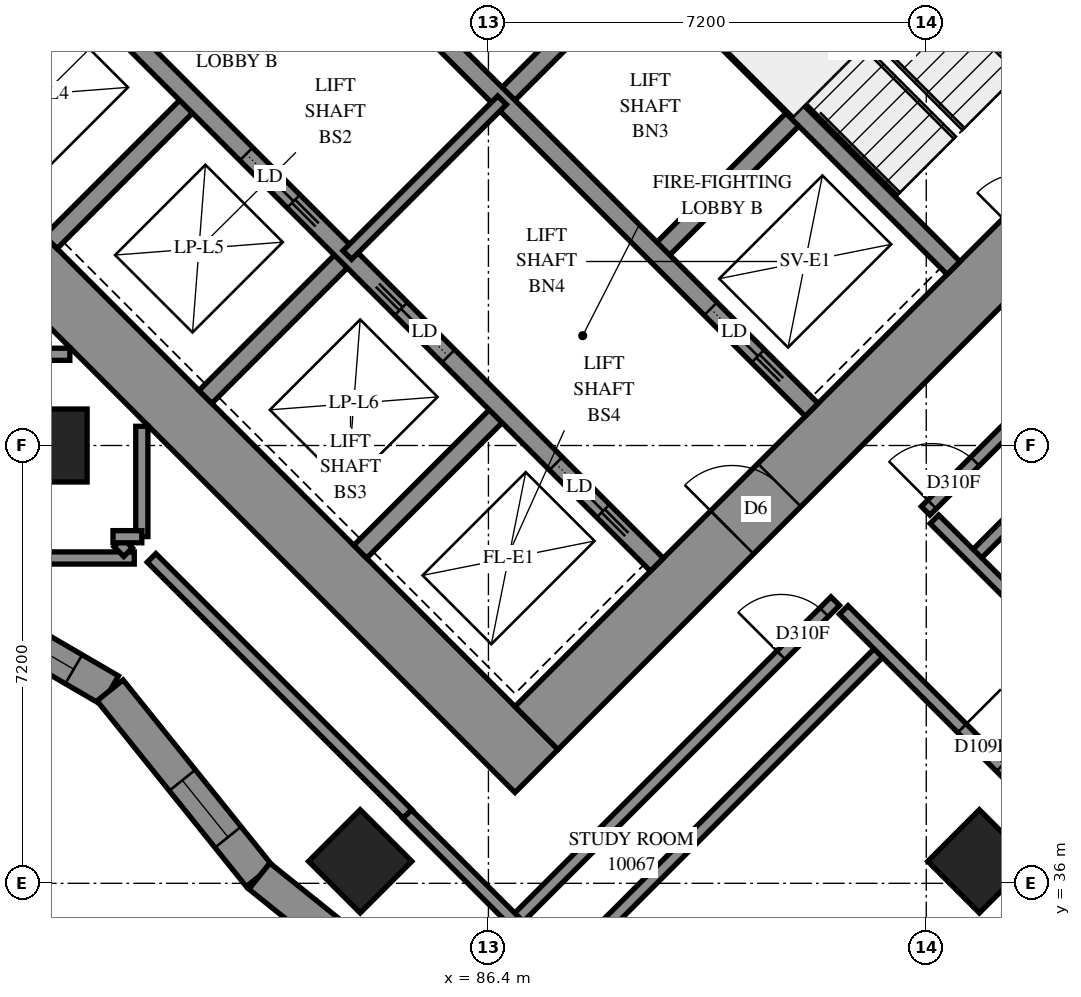
"""IFC4 building model, lengths in metres.
Left out: names, types, materials, properties, quantities, classifications, styles, units other than length and angle.
Written with IfcOpenShell. Run it as: python <this file> out.ifc"""

import sys

from ifc_helpers import new_model, si_unit, direction, frame, frame_2d, origin, origin_2d, place, context, subcontext, project, spatial, polyline, rectangle, outline, extrude, element, fill, save


model = new_model("IFC4")
c1 = context("Model", 3, precision=1e-05, world=origin(), true_north=direction((0.0, 1.0)))
c2 = subcontext(c1, "Body", "Model", "MODEL_VIEW")
j1 = project(units=[si_unit("LENGTHUNIT", "METRE"), si_unit("PLANEANGLEUNIT", "RADIAN")], contexts=[c1])
p1 = place(None, origin())
s1 = spatial("IfcSite", under=j1, at=p1, CompositionType="ELEMENT")
p2 = place(p1, origin())
s2 = spatial("IfcBuilding", under=s1, at=p2, CompositionType="ELEMENT")
p3 = place(p2, frame((0.0, 0.0, 40.6)))
s3 = spatial("IfcBuildingStorey", under=s2, at=p3, CompositionType="ELEMENT", Elevation=40.6)
for number, where, z_axis, x_axis in (
    (1, (79.2, 43.2, 0.0), (0.0, 0.0, 1.0), (1.0, 0.0, 0.0)),
    (2, (84.291, 36.362, 0.0), (0.0, 0.0, 1.0), (0.707, -0.707, 0.0)),
    (3, (94.474, 36.362, 0.0), (0.0, 0.0, 1.0), (0.707, -0.707, 0.0)),
):
    element("IfcColumn", number, at=place(p3, frame(where, z_axis=z_axis, x_axis=x_axis)), inside=s3, PredefinedType="COLUMN", context=c2, shape_type="SweptSolid", body=[
        extrude(rectangle(XDim=1.2, YDim=1.2, at=origin_2d()), origin(), (0.0, 0.0, 1.0), 3.1),
    ])
p4 = place(p3, frame((75.594, 49.443, -0.3), z_axis=(0.0, 0.0, 1.0), x_axis=(0.7071037324, -0.70710983, 0.0)))
e4 = element("IfcWall", 4, at=p4, inside=s3, PredefinedType="SHEAR", context=c2, shape_type="SweptSolid", body=[
    extrude(rectangle(XDim=16.4, YDim=1.0, at=frame_2d((8.2, 0.0))), origin(), (0.0, 0.0, 1.0), 2.7),
])
p5 = place(p3, frame((86.483, 60.333, -0.3), z_axis=(0.0, 0.0, 1.0), x_axis=(0.70710983, -0.7071037324, 0.0)))
e5 = element("IfcWall", 5, at=p5, inside=s3, PredefinedType="SHEAR", context=c2, shape_type="SweptSolid", body=[
    extrude(rectangle(XDim=16.4, YDim=1.0, at=frame_2d((8.2, 0.0))), origin(), (0.0, 0.0, 1.0), 2.7),
])
p6 = place(p5, frame((11.0, 0.0, 0.3)))
e6 = element("IfcOpeningElement", 6, at=p6, cuts=e5, PredefinedType="OPENING", context=c2, shape_type="SweptSolid", body=[
    extrude(rectangle(XDim=0.8, YDim=2.1, at=frame_2d((0.4, 1.05))), frame((0.0, 0.51, 0.0), z_axis=(0.0, -1.0, 0.0), x_axis=(1.0, 0.0, 0.0)), (0.0, 0.0, 1.0), 1.02),
])
p7 = place(p3, frame((76.301, 49.443, -0.3), z_axis=(0.0, 0.0, 1.0), x_axis=(0.7071067812, 0.7071067812, 0.0)))
e7 = element("IfcWall", 7, at=p7, inside=s3, PredefinedType="SHEAR", context=c2, shape_type="SweptSolid", body=[
    extrude(rectangle(XDim=14.4, YDim=1.0, at=frame_2d((7.2, 0.0))), origin(), (0.0, 0.0, 1.0), 2.7),
])
p8 = place(p7, frame((4.55, 0.0, 0.3)))
e8 = element("IfcOpeningElement", 8, at=p8, cuts=e7, PredefinedType="OPENING", context=c2, shape_type="SweptSolid", body=[
    extrude(rectangle(XDim=1.1, YDim=2.1, at=frame_2d((0.55, 1.05))), frame((0.0, 0.51, 0.0), z_axis=(0.0, -1.0, 0.0), x_axis=(1.0, 0.0, 0.0)), (0.0, 0.0, 1.0), 1.02),
])
p9 = place(p7, frame((11.35, 0.0, 0.3)))
e9 = element("IfcOpeningElement", 9, at=p9, cuts=e7, PredefinedType="OPENING", context=c2, shape_type="SweptSolid", body=[
    extrude(rectangle(XDim=1.1, YDim=2.1, at=frame_2d((0.55, 1.05))), frame((0.0, 0.51, 0.0), z_axis=(0.0, -1.0, 0.0), x_axis=(1.0, 0.0, 0.0)), (0.0, 0.0, 1.0), 1.02),
])
p10 = place(p3, frame((87.19, 38.554, -0.3), z_axis=(0.0, 0.0, 1.0), x_axis=(0.707103309, 0.7071102534, 0.0)))
e10 = element("IfcWall", 10, at=p10, inside=s3, PredefinedType="SHEAR", context=c2, shape_type="SweptSolid", body=[
    extrude(rectangle(XDim=14.4, YDim=1.0, at=frame_2d((7.2, 0.0))), origin(), (0.0, 0.0, 1.0), 2.7),
])
p11 = place(p10, frame((4.55, 0.0, 0.3)))
e11 = element("IfcOpeningElement", 11, at=p11, cuts=e10, PredefinedType="OPENING", context=c2, shape_type="SweptSolid", body=[
    extrude(rectangle(XDim=1.1, YDim=2.1, at=frame_2d((0.55, 1.05))), frame((0.0, 0.51, 0.0), z_axis=(0.0, -1.0, 0.0), x_axis=(1.0, 0.0, 0.0)), (0.0, 0.0, 1.0), 1.02),
])
p12 = place(p10, frame((11.35, 0.0, 0.3)))
e12 = element("IfcOpeningElement", 12, at=p12, cuts=e10, PredefinedType="OPENING", context=c2, shape_type="SweptSolid", body=[
    extrude(rectangle(XDim=1.1, YDim=2.1, at=frame_2d((0.55, 1.05))), frame((0.0, 0.51, 0.0), z_axis=(0.0, -1.0, 0.0), x_axis=(1.0, 0.0, 0.0)), (0.0, 0.0, 1.0), 1.02),
])
p13 = place(p3, frame((79.2, 46.544, 0.0), z_axis=(0.0, 0.0, 1.0), x_axis=(0.7071219326, 0.7070916295, 0.0)))
e13 = element("IfcWall", 13, at=p13, inside=s3, PredefinedType="SOLIDWALL", context=c2, shape_type="SweptSolid", body=[
    extrude(rectangle(XDim=3.3, YDim=0.3, at=frame_2d((1.65, 0.0))), origin(), (0.0, 0.0, 1.0), 3.1),
])
p14 = place(p3, frame((81.746, 43.999, 0.0), z_axis=(0.0, 0.0, 1.0), x_axis=(0.7071067812, 0.7071067812, 0.0)))
e14 = element("IfcWall", 14, at=p14, inside=s3, PredefinedType="SOLIDWALL", context=c2, shape_type="SweptSolid", body=[
    extrude(rectangle(XDim=3.3, YDim=0.3, at=frame_2d((1.65, 0.0))), origin(), (0.0, 0.0, 1.0), 3.1),
])
p15 = place(p3, frame((86.625, 48.878, 0.0), z_axis=(0.0, 0.0, 1.0), x_axis=(0.7071067812, 0.7071067812, 0.0)))
e15 = element("IfcWall", 15, at=p15, inside=s3, PredefinedType="SOLIDWALL", context=c2, shape_type="SweptSolid", body=[
    extrude(rectangle(XDim=3.3, YDim=0.3, at=frame_2d((1.65, 0.0))), origin(), (0.0, 0.0, 1.0), 3.1),
])
p16 = place(p3, frame((84.291, 41.453, 0.0), z_axis=(0.0, 0.0, 1.0), x_axis=(0.7071067812, 0.7071067812, 0.0)))
e16 = element("IfcWall", 16, at=p16, inside=s3, PredefinedType="SOLIDWALL", context=c2, shape_type="SweptSolid", body=[
    extrude(rectangle(XDim=3.3, YDim=0.3, at=frame_2d((1.65, 0.0))), origin(), (0.0, 0.0, 1.0), 3.1),
])
p17 = place(p3, frame((89.17, 46.332, 0.0), z_axis=(0.0, 0.0, 1.0), x_axis=(0.7071067812, 0.7071067812, 0.0)))
e17 = element("IfcWall", 17, at=p17, inside=s3, PredefinedType="SOLIDWALL", context=c2, shape_type="SweptSolid", body=[
    extrude(rectangle(XDim=3.3, YDim=0.3, at=frame_2d((1.65, 0.0))), origin(), (0.0, 0.0, 1.0), 3.1),
])
p18 = place(p3, frame((78.988, 51.423, 0.0), z_axis=(0.0, 0.0, 1.0), x_axis=(0.7071067812, -0.7071067812, 0.0)))
e18 = element("IfcWall", 18, at=p18, inside=s3, PredefinedType="SOLIDWALL", context=c2, shape_type="SweptSolid", body=[
    extrude(rectangle(XDim=14.4, YDim=0.3, at=frame_2d((7.2, 0.0))), origin(), (0.0, 0.0, 1.0), 3.1),
])
p19 = place(p18, frame((1.25, 0.0, 0.0)))
e19 = element("IfcOpeningElement", 19, at=p19, cuts=e18, PredefinedType="OPENING", context=c2, shape_type="SweptSolid", body=[
    extrude(rectangle(XDim=1.1, YDim=2.1, at=frame_2d((0.55, 1.05))), frame((0.0, 0.16, 0.0), z_axis=(0.0, -1.0, 0.0), x_axis=(1.0, 0.0, 0.0)), (0.0, 0.0, 1.0), 0.32),
])
p20 = place(p18, frame((4.85, 0.0, 0.0)))
e20 = element("IfcOpeningElement", 20, at=p20, cuts=e18, PredefinedType="OPENING", context=c2, shape_type="SweptSolid", body=[
    extrude(rectangle(XDim=1.1, YDim=2.1, at=frame_2d((0.55, 1.05))), frame((0.0, 0.16, 0.0), z_axis=(0.0, -1.0, 0.0), x_axis=(1.0, 0.0, 0.0)), (0.0, 0.0, 1.0), 0.32),
])
p21 = place(p18, frame((8.45, 0.0, 0.0)))
e21 = element("IfcOpeningElement", 21, at=p21, cuts=e18, PredefinedType="OPENING", context=c2, shape_type="SweptSolid", body=[
    extrude(rectangle(XDim=1.1, YDim=2.1, at=frame_2d((0.55, 1.05))), frame((0.0, 0.16, 0.0), z_axis=(0.0, -1.0, 0.0), x_axis=(1.0, 0.0, 0.0)), (0.0, 0.0, 1.0), 0.32),
])
p22 = place(p18, frame((12.05, 0.0, 0.0)))
e22 = element("IfcOpeningElement", 22, at=p22, cuts=e18, PredefinedType="OPENING", context=c2, shape_type="SweptSolid", body=[
    extrude(rectangle(XDim=1.1, YDim=2.1, at=frame_2d((0.55, 1.05))), frame((0.0, 0.16, 0.0), z_axis=(0.0, -1.0, 0.0), x_axis=(1.0, 0.0, 0.0)), (0.0, 0.0, 1.0), 0.32),
])
p23 = place(p3, frame((81.534, 53.969, 0.0), z_axis=(0.0, 0.0, 1.0), x_axis=(0.707103309, -0.7071102534, 0.0)))
e23 = element("IfcWall", 23, at=p23, inside=s3, PredefinedType="SOLIDWALL", context=c2, shape_type="SweptSolid", body=[
    extrude(rectangle(XDim=14.4, YDim=0.3, at=frame_2d((7.2, 0.0))), origin(), (0.0, 0.0, 1.0), 3.1),
])
p24 = place(p23, frame((12.05, 0.0, 0.0)))
e24 = element("IfcOpeningElement", 24, at=p24, cuts=e23, PredefinedType="OPENING", context=c2, shape_type="SweptSolid", body=[
    extrude(rectangle(XDim=1.1, YDim=2.1, at=frame_2d((0.55, 1.05))), frame((0.0, 0.16, 0.0), z_axis=(0.0, -1.0, 0.0), x_axis=(1.0, 0.0, 0.0)), (0.0, 0.0, 1.0), 0.32),
])
p25 = place(p3, frame((88.958, 51.211, 0.0), z_axis=(0.0, 0.0, 1.0), x_axis=(0.7070998367, -0.7071137256, 0.0)))
e25 = element("IfcWall", 25, at=p25, inside=s3, PredefinedType="SOLIDWALL", context=c2, shape_type="SweptSolid", body=[
    extrude(rectangle(XDim=7.2, YDim=0.3, at=frame_2d((3.6, 0.0))), origin(), (0.0, 0.0, 1.0), 3.1),
])
p26 = place(p3, frame((76.643, 41.233, 0.0), z_axis=(0.0, 0.0, 1.0), x_axis=(0.8639313483, -0.5036095962, 0.0)))
e26 = element("IfcWall", 26, at=p26, inside=s3, PredefinedType="SOLIDWALL", context=c2, shape_type="SweptSolid", body=[
    extrude(outline(polyline([(0.033, -0.275), (4.04, -0.275), (4.142, 0.275), (-0.033, 0.275), (0.033, -0.275)])), origin(), (0.0, 0.0, 1.0), 3.1),
])
p27 = place(p26, frame((2.2, 0.0, 0.5)))
e27 = element("IfcOpeningElement", 27, at=p27, cuts=e26, PredefinedType="OPENING", context=c2, shape_type="SweptSolid", body=[
    extrude(rectangle(XDim=1.2, YDim=2.45, at=frame_2d((0.6, 1.225))), frame((0.0, 0.285, 0.0), z_axis=(0.0, -1.0, 0.0), x_axis=(1.0, 0.0, 0.0)), (0.0, 0.0, 1.0), 0.57),
])
p28 = place(p26, frame((0.854, 0.0, 0.45)))
e28 = element("IfcOpeningElement", 28, at=p28, cuts=e26, PredefinedType="OPENING", context=c2, shape_type="SweptSolid", body=[
    extrude(rectangle(XDim=0.8, YDim=2.5, at=frame_2d((0.4, 1.25))), frame((0.0, 0.285, 0.0), z_axis=(0.0, -1.0, 0.0), x_axis=(1.0, 0.0, 0.0)), (0.0, 0.0, 1.0), 0.57),
])
p29 = place(p3, frame((80.177, 39.173, 0.0), z_axis=(0.0, 0.0, 1.0), x_axis=(0.6265945981, -0.7793453725, 0.0)))
e29 = element("IfcWall", 29, at=p29, inside=s3, PredefinedType="SOLIDWALL", context=c2, shape_type="SweptSolid", body=[
    extrude(outline(polyline([(0.051, -0.275), (3.949, -0.275), (3.889, 0.275), (-0.051, 0.275), (0.051, -0.275)])), origin(), (0.0, 0.0, 1.0), 3.1),
])
p30 = place(p29, frame((1.897, 0.0, 0.5)))
e30 = element("IfcOpeningElement", 30, at=p30, cuts=e29, PredefinedType="OPENING", context=c2, shape_type="SweptSolid", body=[
    extrude(rectangle(XDim=1.2, YDim=2.45, at=frame_2d((0.6, 1.225))), frame((0.0, 0.285, 0.0), z_axis=(0.0, -1.0, 0.0), x_axis=(1.0, 0.0, 0.0)), (0.0, 0.0, 1.0), 0.57),
])
p31 = place(p3, frame((82.633, 36.119, 0.0), z_axis=(0.0, 0.0, 1.0), x_axis=(0.7793447186, -0.6265954114, 0.0)))
e31 = element("IfcWall", 31, at=p31, inside=s3, PredefinedType="SOLIDWALL", context=c2, shape_type="SweptSolid", body=[
    extrude(outline(polyline([(-0.03, -0.275), (3.868, -0.275), (3.928, 0.275), (0.03, 0.275), (-0.03, -0.275)])), origin(), (0.0, 0.0, 1.0), 3.1),
])
p32 = place(p31, frame((1.752, 0.0, 0.5)))
e32 = element("IfcOpeningElement", 32, at=p32, cuts=e31, PredefinedType="OPENING", context=c2, shape_type="SweptSolid", body=[
    extrude(rectangle(XDim=1.2, YDim=2.45, at=frame_2d((0.6, 1.225))), frame((0.0, 0.285, 0.0), z_axis=(0.0, -1.0, 0.0), x_axis=(1.0, 0.0, 0.0)), (0.0, 0.0, 1.0), 0.57),
])
p33 = place(p3, frame((91.313, 53.354, 0.0), z_axis=(0.0, 0.0, 1.0), x_axis=(0.7071140275, -0.7070995348, 0.0)))
e33 = element("IfcWall", 33, at=p33, inside=s3, PredefinedType="PARTITIONING", context=c2, shape_type="SweptSolid", body=[
    extrude(rectangle(XDim=6.9, YDim=0.15, at=frame_2d((3.45, 0.0))), origin(), (0.0, 0.0, 1.0), 3.1),
])
p34 = place(p3, frame((84.079, 46.332, 0.0), z_axis=(0.0, 0.0, 1.0), x_axis=(0.7071067812, 0.7071067812, 0.0)))
e34 = element("IfcWall", 34, at=p34, inside=s3, PredefinedType="PARTITIONING", context=c2, shape_type="SweptSolid", body=[
    extrude(rectangle(XDim=3.6, YDim=0.2, at=frame_2d((1.8, 0.0))), origin(), (0.0, 0.0, 1.0), 3.1),
])
p35 = place(p3, frame((94.367, 41.349, 0.0), z_axis=(0.0, 0.0, 1.0), x_axis=(0.7071109856, 0.7071025768, 0.0)))
e35 = element("IfcWall", 35, at=p35, inside=s3, PredefinedType="PARTITIONING", context=c2, shape_type="SweptSolid", body=[
    extrude(rectangle(XDim=11.892, YDim=0.2, at=frame_2d((5.946, 0.0))), origin(), (0.0, 0.0, 1.0), 3.1),
])
p36 = place(p3, frame((93.59, 42.126, 0.0), z_axis=(0.0, 0.0, 1.0), x_axis=(0.7071067812, 0.7071067812, 0.0)))
e36 = element("IfcWall", 36, at=p36, inside=s3, PredefinedType="PARTITIONING", context=c2, shape_type="SweptSolid", body=[
    extrude(rectangle(XDim=9.849, YDim=0.2, at=frame_2d((4.924, 0.0))), origin(), (0.0, 0.0, 1.0), 3.1),
])
p37 = place(p36, frame((0.148, 0.0, 0.0)))
e37 = element("IfcOpeningElement", 37, at=p37, cuts=e36, PredefinedType="OPENING", context=c2, shape_type="SweptSolid", body=[
    extrude(rectangle(XDim=1.0, YDim=2.1, at=frame_2d((0.5, 1.05))), frame((0.0, 0.11, 0.0), z_axis=(0.0, -1.0, 0.0), x_axis=(1.0, 0.0, 0.0)), (0.0, 0.0, 1.0), 0.22),
])
p38 = place(p3, frame((86.327, 33.299, 0.0), z_axis=(0.0, 0.0, 1.0), x_axis=(0.7069989659, 0.7072145801, 0.0)))
e38 = element("IfcWall", 38, at=p38, inside=s3, PredefinedType="PARTITIONING", context=c2, shape_type="SweptSolid", body=[
    extrude(rectangle(XDim=9.276, YDim=0.2, at=frame_2d((4.638, 0.0))), origin(), (0.0, 0.0, 1.0), 3.1),
])
p39 = place(p3, frame((92.243, 40.495, 0.0), z_axis=(0.0, 0.0, 1.0), x_axis=(0.7071067812, -0.7071067812, 0.0)))
e39 = element("IfcWall", 39, at=p39, inside=s3, PredefinedType="PARTITIONING", context=c2, shape_type="SweptSolid", body=[
    extrude(rectangle(XDim=8.101, YDim=0.2, at=frame_2d((4.05, 0.0))), origin(), (0.0, 0.0, 1.0), 3.1),
])
p40 = place(p39, frame((2.75, 0.0, 0.0)))
e40 = element("IfcOpeningElement", 40, at=p40, cuts=e39, PredefinedType="OPENING", context=c2, shape_type="SweptSolid", body=[
    extrude(rectangle(XDim=0.9, YDim=2.1, at=frame_2d((0.45, 1.05))), frame((0.0, 0.11, 0.0), z_axis=(0.0, -1.0, 0.0), x_axis=(1.0, 0.0, 0.0)), (0.0, 0.0, 1.0), 0.22),
])
p41 = place(p3, frame((86.836, 35.372, 0.0), z_axis=(0.0, 0.0, 1.0), x_axis=(0.7071067812, 0.7071067812, 0.0)))
e41 = element("IfcWall", 41, at=p41, inside=s3, PredefinedType="PARTITIONING", context=c2, shape_type="SweptSolid", body=[
    extrude(rectangle(XDim=7.45, YDim=0.2, at=frame_2d((3.725, 0.0))), origin(), (0.0, 0.0, 1.0), 3.1),
])
p42 = place(p41, frame((6.192, 0.0, 0.0)))
e42 = element("IfcOpeningElement", 42, at=p42, cuts=e41, PredefinedType="OPENING", context=c2, shape_type="SweptSolid", body=[
    extrude(rectangle(XDim=1.0, YDim=2.1, at=frame_2d((0.5, 1.05))), frame((0.0, 0.11, 0.0), z_axis=(0.0, -1.0, 0.0), x_axis=(1.0, 0.0, 0.0)), (0.0, 0.0, 1.0), 0.22),
])
p43 = place(p3, frame((85.07, 37.142, 0.0), z_axis=(0.0, 0.0, 1.0), x_axis=(-0.7070899851, 0.7071235769, 0.0)))
e43 = element("IfcWall", 43, at=p43, inside=s3, PredefinedType="PARTITIONING", context=c2, shape_type="SweptSolid", body=[
    extrude(rectangle(XDim=5.954, YDim=0.2, at=frame_2d((2.977, 0.0))), origin(), (0.0, 0.0, 1.0), 3.1),
])
p44 = place(p3, frame((93.735, 41.987, 0.0), z_axis=(0.0, 0.0, 1.0), x_axis=(0.7071067812, -0.7071067812, 0.0)))
e44 = element("IfcWall", 44, at=p44, inside=s3, PredefinedType="PARTITIONING", context=c2, shape_type="SweptSolid", body=[
    extrude(rectangle(XDim=4.5, YDim=0.2, at=frame_2d((2.25, 0.0))), origin(), (0.0, 0.0, 1.0), 3.1),
])
p45 = place(p44, frame((3.274, 0.0, 0.0)))
e45 = element("IfcOpeningElement", 45, at=p45, cuts=e44, PredefinedType="OPENING", context=c2, shape_type="SweptSolid", body=[
    extrude(rectangle(XDim=1.0, YDim=2.1, at=frame_2d((0.5, 1.05))), frame((0.0, 0.11, 0.0), z_axis=(0.0, -1.0, 0.0), x_axis=(1.0, 0.0, 0.0)), (0.0, 0.0, 1.0), 0.22),
])
p46 = place(p3, frame((85.065, 37.137, 0.0), z_axis=(0.0, 0.0, 1.0), x_axis=(0.7071067812, -0.7071067812, 0.0)))
e46 = element("IfcWall", 46, at=p46, inside=s3, PredefinedType="PARTITIONING", context=c2, shape_type="SweptSolid", body=[
    extrude(rectangle(XDim=2.5, YDim=0.2, at=frame_2d((1.25, 0.0))), origin(), (0.0, 0.0, 1.0), 3.1),
])
p47 = place(p3, frame((94.511, 34.839, 0.0), z_axis=(0.0, 0.0, 1.0), x_axis=(0.7075233388, 0.706689978, 0.0)))
e47 = element("IfcWall", 47, at=p47, inside=s3, PredefinedType="PARTITIONING", context=c2, shape_type="SweptSolid", body=[
    extrude(rectangle(XDim=2.4, YDim=0.15, at=frame_2d((1.2, 0.0))), origin(), (0.0, 0.0, 1.0), 3.1),
])
for number, where, z_axis, x_axis in (
    (48, (77.702, 44.7, 0.0), (0.0, 0.0, 1.0), (1.0, 0.0, 0.0)),
    (49, (80.7, 41.702, 0.0), (0.0, 0.0, 1.0), (0.0, 1.0, 0.0)),
):
    element("IfcWall", number, at=place(p3, frame(where, z_axis=z_axis, x_axis=x_axis)), inside=s3, PredefinedType="PARTITIONING", context=c2, shape_type="SweptSolid", body=[
        extrude(rectangle(XDim=1.814, YDim=0.2, at=frame_2d((0.907, 0.0))), origin(), (0.0, 0.0, 1.0), 3.1),
    ])
p48 = place(p3, frame((79.098, 41.35, 0.0), z_axis=(0.0, 0.0, 1.0), x_axis=(1.0, 0.0, 0.0)))
e50 = element("IfcWall", 50, at=p48, inside=s3, PredefinedType="PARTITIONING", context=c2, shape_type="SweptSolid", body=[
    extrude(rectangle(XDim=1.478, YDim=0.2, at=frame_2d((0.739, 0.0))), origin(), (0.0, 0.0, 1.0), 3.1),
])
p49 = place(p3, frame((80.315, 41.605, 0.0), z_axis=(0.0, 0.0, 1.0), x_axis=(0.7071067812, -0.7071067812, 0.0)))
e51 = element("IfcWall", 51, at=p49, inside=s3, PredefinedType="PARTITIONING", context=c2, shape_type="SweptSolid", body=[
    extrude(rectangle(XDim=0.225, YDim=0.2, at=frame_2d((0.113, 0.0))), origin(), (0.0, 0.0, 1.0), 3.1),
])
p50 = place(p3, frame((80.226, 41.7, 0.0), z_axis=(0.0, 0.0, 1.0), x_axis=(1.0, 0.0, 0.0)))
e52 = element("IfcWall", 52, at=p50, inside=s3, PredefinedType="PARTITIONING", context=c2, shape_type="SweptSolid", body=[
    extrude(rectangle(XDim=0.474, YDim=0.2, at=frame_2d((0.237, 0.0))), origin(), (0.0, 0.0, 1.0), 3.1),
])
p51 = place(p27, origin())
e53 = element("IfcWindow", 53, at=p51, inside=s3, PartitioningType="SINGLE_PANEL", PredefinedType="WINDOW", context=c2, shape_type="SweptSolid", body=[
    extrude(rectangle(XDim=1.2, YDim=2.45, at=frame_2d((0.6, 1.225))), frame((0.0, 0.155, 0.0), z_axis=(0.0, -1.0, 0.0), x_axis=(1.0, 0.0, 0.0)), (0.0, 0.0, 1.0), 0.06),
])
fill(e27, e53)
p52 = place(p30, origin())
e54 = element("IfcWindow", 54, at=p52, inside=s3, PartitioningType="SINGLE_PANEL", PredefinedType="WINDOW", context=c2, shape_type="SweptSolid", body=[
    extrude(rectangle(XDim=1.2, YDim=2.45, at=frame_2d((0.6, 1.225))), frame((0.0, 0.155, 0.0), z_axis=(0.0, -1.0, 0.0), x_axis=(1.0, 0.0, 0.0)), (0.0, 0.0, 1.0), 0.06),
])
fill(e30, e54)
p53 = place(p11, origin())
e55 = element("IfcDoor", 55, at=p53, inside=s3, OperationType="DOUBLE_DOOR_SINGLE_SWING", PredefinedType="DOOR", context=c2, shape_type="SweptSolid", body=[
    extrude(rectangle(XDim=1.1, YDim=2.1, at=frame_2d((0.55, 1.05))), frame((0.0, 0.025, 0.0), z_axis=(0.0, -1.0, 0.0), x_axis=(1.0, 0.0, 0.0)), (0.0, 0.0, 1.0), 0.05),
])
fill(e11, e55)
p54 = place(p20, origin())
e56 = element("IfcDoor", 56, at=p54, inside=s3, OperationType="SLIDING_TO_RIGHT", PredefinedType="DOOR", context=c2, shape_type="SweptSolid", body=[
    extrude(rectangle(XDim=1.1, YDim=2.1, at=frame_2d((0.55, 1.05))), frame((0.0, 0.025, 0.0), z_axis=(0.0, -1.0, 0.0), x_axis=(1.0, 0.0, 0.0)), (0.0, 0.0, 1.0), 0.05),
])
fill(e20, e56)
p55 = place(p21, origin())
e57 = element("IfcDoor", 57, at=p55, inside=s3, OperationType="SLIDING_TO_LEFT", PredefinedType="DOOR", context=c2, shape_type="SweptSolid", body=[
    extrude(rectangle(XDim=1.1, YDim=2.1, at=frame_2d((0.55, 1.05))), frame((0.0, 0.025, 0.0), z_axis=(0.0, -1.0, 0.0), x_axis=(1.0, 0.0, 0.0)), (0.0, 0.0, 1.0), 0.05),
])
fill(e21, e57)
p56 = place(p22, origin())
e58 = element("IfcDoor", 58, at=p56, inside=s3, OperationType="SLIDING_TO_RIGHT", PredefinedType="DOOR", context=c2, shape_type="SweptSolid", body=[
    extrude(rectangle(XDim=1.1, YDim=2.1, at=frame_2d((0.55, 1.05))), frame((0.0, 0.025, 0.0), z_axis=(0.0, -1.0, 0.0), x_axis=(1.0, 0.0, 0.0)), (0.0, 0.0, 1.0), 0.05),
])
fill(e22, e58)
p57 = place(p24, origin())
e59 = element("IfcDoor", 59, at=p57, inside=s3, OperationType="SLIDING_TO_RIGHT", PredefinedType="DOOR", context=c2, shape_type="SweptSolid", body=[
    extrude(rectangle(XDim=1.1, YDim=2.1, at=frame_2d((0.55, 1.05))), frame((0.0, 0.025, 0.0), z_axis=(0.0, -1.0, 0.0), x_axis=(1.0, 0.0, 0.0)), (0.0, 0.0, 1.0), 0.05),
])
fill(e24, e59)
p58 = place(p37, origin())
e60 = element("IfcDoor", 60, at=p58, inside=s3, OperationType="SINGLE_SWING_LEFT", PredefinedType="DOOR", context=c2, shape_type="SweptSolid", body=[
    extrude(rectangle(XDim=1.0, YDim=2.1, at=frame_2d((0.5, 1.05))), frame((0.0, 0.025, 0.0), z_axis=(0.0, -1.0, 0.0), x_axis=(1.0, 0.0, 0.0)), (0.0, 0.0, 1.0), 0.05),
])
fill(e37, e60)
p59 = place(p42, origin())
e61 = element("IfcDoor", 61, at=p59, inside=s3, OperationType="SINGLE_SWING_RIGHT", PredefinedType="DOOR", context=c2, shape_type="SweptSolid", body=[
    extrude(rectangle(XDim=1.0, YDim=2.1, at=frame_2d((0.5, 1.05))), frame((0.0, 0.025, 0.0), z_axis=(0.0, -1.0, 0.0), x_axis=(1.0, 0.0, 0.0)), (0.0, 0.0, 1.0), 0.05),
])
fill(e42, e61)
p60 = place(p40, origin())
e62 = element("IfcDoor", 62, at=p60, inside=s3, OperationType="SINGLE_SWING_LEFT", PredefinedType="DOOR", context=c2, shape_type="SweptSolid", body=[
    extrude(rectangle(XDim=0.9, YDim=2.1, at=frame_2d((0.45, 1.05))), frame((0.0, 0.025, 0.0), z_axis=(0.0, -1.0, 0.0), x_axis=(1.0, 0.0, 0.0)), (0.0, 0.0, 1.0), 0.05),
])
fill(e40, e62)
save(model, sys.argv[1])
